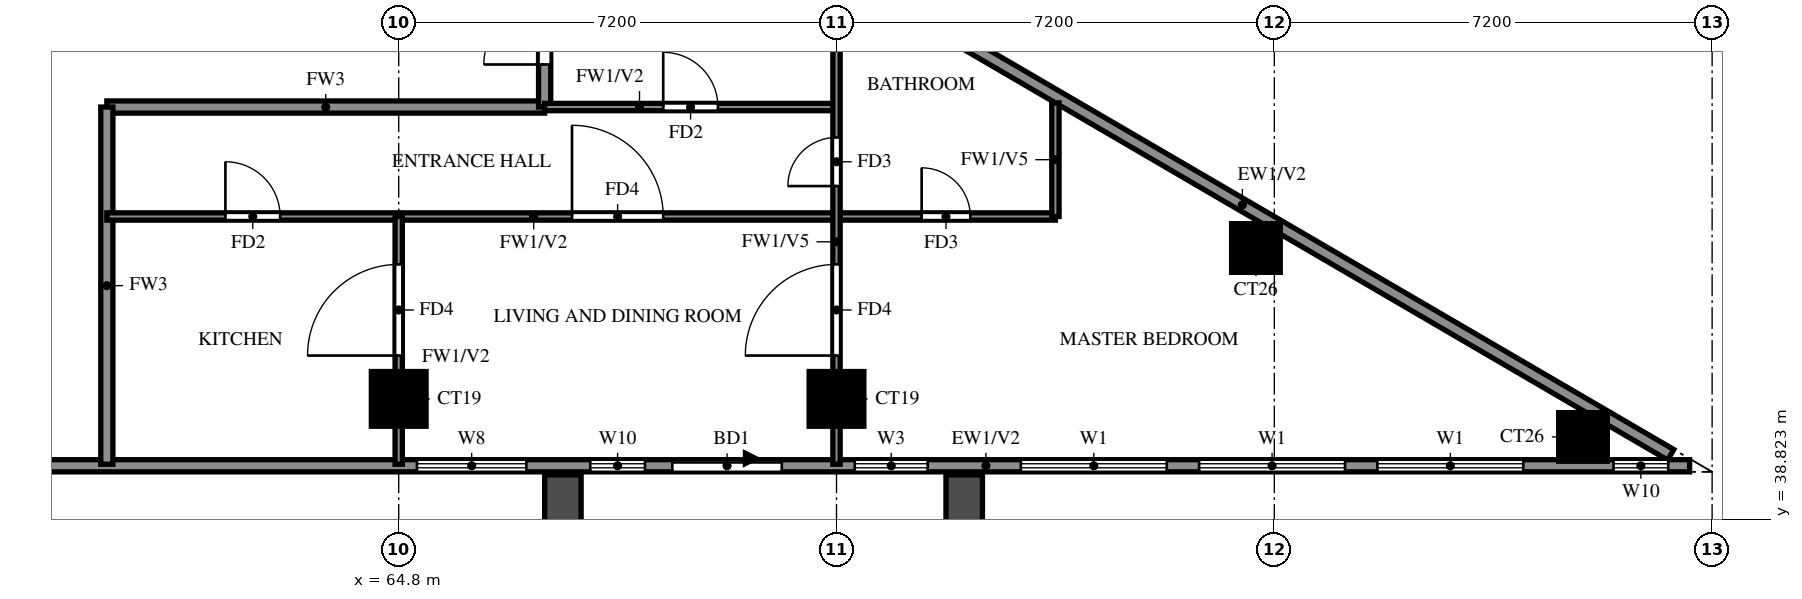
"""IFC4 building model, lengths in metres.
Left out: names, types, materials, properties, quantities, classifications, styles, units other than length and angle.
Written with IfcOpenShell. Run it as: python <this file> out.ifc"""

import sys

from ifc_helpers import new_model, si_unit, direction, frame, frame_2d, origin, origin_2d, place, context, subcontext, project, spatial, rectangle, extrude, source, transform, mapped, element, fill, save


model = new_model("IFC4")
c1 = context("Model", 3, precision=1e-05, world=origin(), true_north=direction((0.0, 1.0)))
c2 = subcontext(c1, "Body", "Model", "MODEL_VIEW")
j1 = project(units=[si_unit("LENGTHUNIT", "METRE"), si_unit("PLANEANGLEUNIT", "RADIAN")], contexts=[c1])
p1 = place(None, origin())
s1 = spatial("IfcSite", under=j1, at=p1, CompositionType="ELEMENT")
p2 = place(p1, origin())
s2 = spatial("IfcBuilding", under=s1, at=p2, CompositionType="ELEMENT")
p3 = place(p2, frame((0.0, 0.0, 185.0)))
s3 = spatial("IfcBuildingStorey", under=s2, at=p3, CompositionType="ELEMENT", Elevation=185.0)
m1 = source(origin(), c2, "Body", "SweptSolid", [
    extrude(rectangle(XDim=0.8, YDim=0.8, at=origin_2d()), origin(), (0.0, 0.0, 1.0), 3.2),
])
p4 = place(p3, frame((84.276, 40.174, 0.0), z_axis=(0.0, 0.0, 1.0), x_axis=(1.0, 0.0, 0.0)))
e1 = element("IfcColumn", 1, at=p4, inside=s3, PredefinedType="COLUMN", context=c2, shape_type="MappedRepresentation", body=[
    mapped(m1, transform((0.0, 0.0, 0.0))),
])
m2 = source(origin(), c2, "Body", "SweptSolid", [
    extrude(rectangle(XDim=0.9, YDim=0.9, at=origin_2d()), origin(), (0.0, 0.0, 1.0), 3.2),
])
for number, where, z_axis, x_axis in (
    (2, (64.8, 40.8, 0.0), (0.0, 0.0, 1.0), (1.0, 0.0, 0.0)),
    (3, (72.0, 40.8, 0.0), (0.0, 0.0, 1.0), (1.0, 0.0, 0.0)),
):
    element("IfcColumn", number, at=place(p3, frame(where, z_axis=z_axis, x_axis=x_axis)), inside=s3, PredefinedType="COLUMN", context=c2, shape_type="MappedRepresentation", body=[
        mapped(m2, transform((0.0, 0.0, 0.0))),
    ])
p5 = place(p3, frame((78.898, 43.282, 0.0), z_axis=(0.0, 0.0, 1.0), x_axis=(1.0, 0.0, 0.0)))
e4 = element("IfcColumn", 4, at=p5, inside=s3, PredefinedType="COLUMN", context=c2, shape_type="MappedRepresentation", body=[
    mapped(m1, transform((0.0, 0.0, 0.0))),
])
p6 = place(p3, frame((85.719, 39.881, 0.0), z_axis=(0.0, 0.0, 1.0), x_axis=(-0.86377618652, 0.503875678716, 0.0)))
e5 = element("IfcWall", 5, at=p6, inside=s3, PredefinedType="SOLIDWALL", context=c2, shape_type="SweptSolid", body=[
    extrude(rectangle(XDim=16.311, YDim=0.2, at=frame_2d((8.156, 0.0))), origin(), (0.0, 0.0, 1.0), 3.2),
])
p7 = place(p6, frame((13.326, 0.0, 1.5)))
e6 = element("IfcOpeningElement", 6, at=p7, cuts=e5, PredefinedType="OPENING", context=c2, shape_type="SweptSolid", body=[
    extrude(rectangle(XDim=0.9, YDim=0.9, at=frame_2d((0.45, 0.45))), frame((0.0, 0.11, 0.0), z_axis=(0.0, -1.0, 0.0), x_axis=(1.0, 0.0, 0.0)), (0.0, 0.0, 1.0), 0.22),
])
p8 = place(p3, frame((58.8, 39.7, 0.0), z_axis=(0.0, 0.0, 1.0), x_axis=(1.0, 0.0, 0.0)))
e7 = element("IfcWall", 7, at=p8, inside=s3, PredefinedType="SOLIDWALL", context=c2, shape_type="SweptSolid", body=[
    extrude(rectangle(XDim=27.23, YDim=0.2, at=frame_2d((13.615, 0.0))), origin(), (0.0, 0.0, 1.0), 3.2),
])
p9 = place(p8, frame((10.5, 0.0, 0.0)))
e8 = element("IfcOpeningElement", 8, at=p9, cuts=e7, PredefinedType="OPENING", context=c2, shape_type="SweptSolid", body=[
    extrude(rectangle(XDim=1.8, YDim=2.4, at=frame_2d((0.9, 1.2))), frame((0.0, 0.11, 0.0), z_axis=(0.0, -1.0, 0.0), x_axis=(1.0, 0.0, 0.0)), (0.0, 0.0, 1.0), 0.22),
])
p10 = place(p8, frame((6.3, 0.0, 0.6)))
e9 = element("IfcOpeningElement", 9, at=p10, cuts=e7, PredefinedType="OPENING", context=c2, shape_type="SweptSolid", body=[
    extrude(rectangle(XDim=1.8, YDim=2.4, at=frame_2d((0.9, 1.2))), frame((0.0, 0.11, 0.0), z_axis=(0.0, -1.0, 0.0), x_axis=(1.0, 0.0, 0.0)), (0.0, 0.0, 1.0), 0.22),
])
p11 = place(p8, frame((9.15, 0.0, 0.6)))
e10 = element("IfcOpeningElement", 10, at=p11, cuts=e7, PredefinedType="OPENING", context=c2, shape_type="SweptSolid", body=[
    extrude(rectangle(XDim=0.9, YDim=2.4, at=frame_2d((0.45, 1.2))), frame((0.0, 0.11, 0.0), z_axis=(0.0, -1.0, 0.0), x_axis=(1.0, 0.0, 0.0)), (0.0, 0.0, 1.0), 0.22),
])
p12 = place(p8, frame((13.5, 0.0, 0.6)))
e11 = element("IfcOpeningElement", 11, at=p12, cuts=e7, PredefinedType="OPENING", context=c2, shape_type="SweptSolid", body=[
    extrude(rectangle(XDim=1.2, YDim=2.4, at=frame_2d((0.6, 1.2))), frame((0.0, 0.11, 0.0), z_axis=(0.0, -1.0, 0.0), x_axis=(1.0, 0.0, 0.0)), (0.0, 0.0, 1.0), 0.22),
])
p13 = place(p8, frame((16.231, 0.0, 0.6)))
e12 = element("IfcOpeningElement", 12, at=p13, cuts=e7, PredefinedType="OPENING", context=c2, shape_type="SweptSolid", body=[
    extrude(rectangle(XDim=2.4, YDim=2.4, at=frame_2d((1.2, 1.2))), frame((0.0, 0.11, 0.0), z_axis=(0.0, -1.0, 0.0), x_axis=(1.0, 0.0, 0.0)), (0.0, 0.0, 1.0), 0.22),
])
p14 = place(p8, frame((19.163, 0.0, 0.6)))
e13 = element("IfcOpeningElement", 13, at=p14, cuts=e7, PredefinedType="OPENING", context=c2, shape_type="SweptSolid", body=[
    extrude(rectangle(XDim=2.4, YDim=2.4, at=frame_2d((1.2, 1.2))), frame((0.0, 0.11, 0.0), z_axis=(0.0, -1.0, 0.0), x_axis=(1.0, 0.0, 0.0)), (0.0, 0.0, 1.0), 0.22),
])
p15 = place(p8, frame((22.094, 0.0, 0.6)))
e14 = element("IfcOpeningElement", 14, at=p15, cuts=e7, PredefinedType="OPENING", context=c2, shape_type="SweptSolid", body=[
    extrude(rectangle(XDim=2.4, YDim=2.4, at=frame_2d((1.2, 1.2))), frame((0.0, 0.11, 0.0), z_axis=(0.0, -1.0, 0.0), x_axis=(1.0, 0.0, 0.0)), (0.0, 0.0, 1.0), 0.22),
])
p16 = place(p8, frame((25.978, 0.0, 0.6)))
e15 = element("IfcOpeningElement", 15, at=p16, cuts=e7, PredefinedType="OPENING", context=c2, shape_type="SweptSolid", body=[
    extrude(rectangle(XDim=0.9, YDim=2.4, at=frame_2d((0.45, 1.2))), frame((0.0, 0.11, 0.0), z_axis=(0.0, -1.0, 0.0), x_axis=(1.0, 0.0, 0.0)), (0.0, 0.0, 1.0), 0.22),
])
for number, where, z_axis, x_axis in (
    (16, (67.5, 39.55, 0.0), (0.0, 0.0, 1.0), (0.0, -1.0, 0.0)),
    (17, (74.1, 39.55, 0.0), (0.0, 0.0, 1.0), (0.0, -1.0, 0.0)),
):
    element("IfcWall", number, at=place(p3, frame(where, z_axis=z_axis, x_axis=x_axis)), inside=s3, PredefinedType="SOLIDWALL", context=c2, shape_type="SweptSolid", body=[
        extrude(rectangle(XDim=2.65, YDim=0.6, at=frame_2d((1.325, 0.0))), origin(), (0.0, 0.0, 1.0), 2.85),
    ])
p17 = place(p3, frame((60.0, 45.6, 0.0), z_axis=(0.0, 0.0, 1.0), x_axis=(1.0, 0.0, 0.0)))
e18 = element("IfcWall", 18, at=p17, inside=s3, PredefinedType="SOLIDWALL", context=c2, shape_type="SweptSolid", body=[
    extrude(rectangle(XDim=7.2, YDim=0.2, at=frame_2d((3.6, 0.0))), origin(), (0.0, 0.0, 1.0), 3.2),
])
p18 = place(p3, frame((60.0, 39.725, 0.0), z_axis=(0.0, 0.0, 1.0), x_axis=(0.0, 1.0, 0.0)))
e19 = element("IfcWall", 19, at=p18, inside=s3, PredefinedType="SOLIDWALL", context=c2, shape_type="SweptSolid", body=[
    extrude(rectangle(XDim=5.875, YDim=0.2, at=frame_2d((2.938, 0.0))), origin(), (0.0, 0.0, 1.0), 3.2),
])
p19 = place(p3, frame((67.2, 45.6, 0.0), z_axis=(0.0, 0.0, 1.0), x_axis=(0.0, 1.0, 0.0)))
e20 = element("IfcWall", 20, at=p19, inside=s3, PredefinedType="SOLIDWALL", context=c2, shape_type="SweptSolid", body=[
    extrude(rectangle(XDim=16.8, YDim=0.2, at=frame_2d((8.4, 0.0))), origin(), (0.0, 0.0, 1.0), 3.2),
])
p20 = place(p19, frame((8.3, 0.0, 0.0)))
e21 = element("IfcOpeningElement", 21, at=p20, cuts=e20, PredefinedType="OPENING", context=c2, shape_type="SweptSolid", body=[
    extrude(rectangle(XDim=1.0, YDim=2.1, at=frame_2d((0.5, 1.05))), frame((0.0, 0.11, 0.0), z_axis=(0.0, -1.0, 0.0), x_axis=(1.0, 0.0, 0.0)), (0.0, 0.0, 1.0), 0.22),
])
p21 = place(p19, frame((15.1, 0.0, 0.0)))
e22 = element("IfcOpeningElement", 22, at=p21, cuts=e20, PredefinedType="OPENING", context=c2, shape_type="SweptSolid", body=[
    extrude(rectangle(XDim=1.0, YDim=2.1, at=frame_2d((0.5, 1.05))), frame((0.0, 0.11, 0.0), z_axis=(0.0, -1.0, 0.0), x_axis=(1.0, 0.0, 0.0)), (0.0, 0.0, 1.0), 0.22),
])
p22 = place(p19, frame((0.7, 0.0, 0.0)))
e23 = element("IfcOpeningElement", 23, at=p22, cuts=e20, PredefinedType="OPENING", context=c2, shape_type="SweptSolid", body=[
    extrude(rectangle(XDim=1.0, YDim=2.1, at=frame_2d((0.5, 1.05))), frame((0.0, 0.11, 0.0), z_axis=(0.0, -1.0, 0.0), x_axis=(1.0, 0.0, 0.0)), (0.0, 0.0, 1.0), 0.22),
])
p23 = place(p3, frame((60.0, 43.8, 0.0), z_axis=(0.0, 0.0, 1.0), x_axis=(1.0, 0.0, 0.0)))
e24 = element("IfcWall", 24, at=p23, inside=s3, PredefinedType="PARTITIONING", context=c2, shape_type="SweptSolid", body=[
    extrude(rectangle(XDim=15.6, YDim=0.12, at=frame_2d((7.8, 0.0))), origin(), (0.0, 0.0, 1.0), 3.2),
])
p24 = place(p23, frame((7.65, 0.0, 0.0)))
e25 = element("IfcOpeningElement", 25, at=p24, cuts=e24, PredefinedType="OPENING", context=c2, shape_type="SweptSolid", body=[
    extrude(rectangle(XDim=1.5, YDim=2.1, at=frame_2d((0.75, 1.05))), frame((0.0, 0.07, 0.0), z_axis=(0.0, -1.0, 0.0), x_axis=(1.0, 0.0, 0.0)), (0.0, 0.0, 1.0), 0.14),
])
p25 = place(p23, frame((1.95, 0.0, 0.0)))
e26 = element("IfcOpeningElement", 26, at=p25, cuts=e24, PredefinedType="OPENING", context=c2, shape_type="SweptSolid", body=[
    extrude(rectangle(XDim=0.9, YDim=2.1, at=frame_2d((0.45, 1.05))), frame((0.0, 0.07, 0.0), z_axis=(0.0, -1.0, 0.0), x_axis=(1.0, 0.0, 0.0)), (0.0, 0.0, 1.0), 0.14),
])
p26 = place(p23, frame((13.4, 0.0, 0.0)))
e27 = element("IfcOpeningElement", 27, at=p26, cuts=e24, PredefinedType="OPENING", context=c2, shape_type="SweptSolid", body=[
    extrude(rectangle(XDim=0.8, YDim=2.1, at=frame_2d((0.4, 1.05))), frame((0.0, 0.07, 0.0), z_axis=(0.0, -1.0, 0.0), x_axis=(1.0, 0.0, 0.0)), (0.0, 0.0, 1.0), 0.14),
])
p27 = place(p3, frame((67.2, 45.6, 0.0), z_axis=(0.0, 0.0, 1.0), x_axis=(1.0, 0.0, 0.0)))
e28 = element("IfcWall", 28, at=p27, inside=s3, PredefinedType="PARTITIONING", context=c2, shape_type="SweptSolid", body=[
    extrude(rectangle(XDim=4.8, YDim=0.12, at=frame_2d((2.4, 0.0))), origin(), (0.0, 0.0, 1.0), 3.2),
])
p28 = place(p27, frame((1.95, 0.0, 0.0)))
e29 = element("IfcOpeningElement", 29, at=p28, cuts=e28, PredefinedType="OPENING", context=c2, shape_type="SweptSolid", body=[
    extrude(rectangle(XDim=0.9, YDim=2.1, at=frame_2d((0.45, 1.05))), frame((0.0, 0.07, 0.0), z_axis=(0.0, -1.0, 0.0), x_axis=(1.0, 0.0, 0.0)), (0.0, 0.0, 1.0), 0.14),
])
p29 = place(p3, frame((64.8, 39.725, 0.0), z_axis=(0.0, 0.0, 1.0), x_axis=(0.0, 1.0, 0.0)))
e30 = element("IfcWall", 30, at=p29, inside=s3, PredefinedType="PARTITIONING", context=c2, shape_type="SweptSolid", body=[
    extrude(rectangle(XDim=4.075, YDim=0.12, at=frame_2d((2.038, 0.0))), origin(), (0.0, 0.0, 1.0), 3.2),
])
p30 = place(p29, frame((1.788, 0.0, 0.0)))
e31 = element("IfcOpeningElement", 31, at=p30, cuts=e30, PredefinedType="OPENING", context=c2, shape_type="SweptSolid", body=[
    extrude(rectangle(XDim=1.5, YDim=2.1, at=frame_2d((0.75, 1.05))), frame((0.0, 0.07, 0.0), z_axis=(0.0, -1.0, 0.0), x_axis=(1.0, 0.0, 0.0)), (0.0, 0.0, 1.0), 0.14),
])
p31 = place(p3, frame((72.0, 39.725, 0.0), z_axis=(0.0, 0.0, 1.0), x_axis=(0.0, 1.0, 0.0)))
e32 = element("IfcWall", 32, at=p31, inside=s3, PredefinedType="PARTITIONING", context=c2, shape_type="SweptSolid", body=[
    extrude(rectangle(XDim=8.13, YDim=0.12, at=frame_2d((4.065, 0.0))), origin(), (0.0, 0.0, 1.0), 2.3),
])
p32 = place(p31, frame((1.788, 0.0, 0.0)))
e33 = element("IfcOpeningElement", 33, at=p32, cuts=e32, PredefinedType="OPENING", context=c2, shape_type="SweptSolid", body=[
    extrude(rectangle(XDim=1.5, YDim=2.1, at=frame_2d((0.75, 1.05))), frame((0.0, 0.07, 0.0), z_axis=(0.0, -1.0, 0.0), x_axis=(1.0, 0.0, 0.0)), (0.0, 0.0, 1.0), 0.14),
])
p33 = place(p31, frame((4.575, 0.0, 0.0)))
e34 = element("IfcOpeningElement", 34, at=p33, cuts=e32, PredefinedType="OPENING", context=c2, shape_type="SweptSolid", body=[
    extrude(rectangle(XDim=0.8, YDim=2.1, at=frame_2d((0.4, 1.05))), frame((0.0, 0.07, 0.0), z_axis=(0.0, -1.0, 0.0), x_axis=(1.0, 0.0, 0.0)), (0.0, 0.0, 1.0), 0.14),
])
p34 = place(p3, frame((75.6, 43.8, 0.0), z_axis=(0.0, 0.0, 1.0), x_axis=(0.0, 1.0, 0.0)))
e35 = element("IfcWall", 35, at=p34, inside=s3, PredefinedType="PARTITIONING", context=c2, shape_type="SweptSolid", body=[
    extrude(rectangle(XDim=1.868, YDim=0.12, at=frame_2d((0.934, 0.0))), origin(), (0.0, 0.0, 1.0), 2.3),
])
p35 = place(p9, origin())
e36 = element("IfcDoor", 36, at=p35, inside=s3, OperationType="DOUBLE_DOOR_SLIDING", PredefinedType="DOOR", context=c2, shape_type="SweptSolid", body=[
    extrude(rectangle(XDim=1.8, YDim=2.4, at=frame_2d((0.9, 1.2))), frame((0.0, 0.025, 0.0), z_axis=(0.0, -1.0, 0.0), x_axis=(1.0, 0.0, 0.0)), (0.0, 0.0, 1.0), 0.05),
])
fill(e8, e36)
p36 = place(p10, origin())
e37 = element("IfcWindow", 37, at=p36, inside=s3, PartitioningType="DOUBLE_PANEL_VERTICAL", PredefinedType="WINDOW", context=c2, shape_type="SweptSolid", body=[
    extrude(rectangle(XDim=1.8, YDim=2.4, at=frame_2d((0.9, 1.2))), frame((0.0, 0.03, 0.0), z_axis=(0.0, -1.0, 0.0), x_axis=(1.0, 0.0, 0.0)), (0.0, 0.0, 1.0), 0.06),
])
fill(e9, e37)
p37 = place(p11, origin())
e38 = element("IfcWindow", 38, at=p37, inside=s3, PartitioningType="SINGLE_PANEL", PredefinedType="WINDOW", context=c2, shape_type="SweptSolid", body=[
    extrude(rectangle(XDim=0.9, YDim=2.4, at=frame_2d((0.45, 1.2))), frame((0.0, 0.03, 0.0), z_axis=(0.0, -1.0, 0.0), x_axis=(1.0, 0.0, 0.0)), (0.0, 0.0, 1.0), 0.06),
])
fill(e10, e38)
p38 = place(p12, origin())
e39 = element("IfcWindow", 39, at=p38, inside=s3, PartitioningType="SINGLE_PANEL", PredefinedType="WINDOW", context=c2, shape_type="SweptSolid", body=[
    extrude(rectangle(XDim=1.2, YDim=2.4, at=frame_2d((0.6, 1.2))), frame((0.0, 0.03, 0.0), z_axis=(0.0, -1.0, 0.0), x_axis=(1.0, 0.0, 0.0)), (0.0, 0.0, 1.0), 0.06),
])
fill(e11, e39)
p39 = place(p13, origin())
e40 = element("IfcWindow", 40, at=p39, inside=s3, PartitioningType="DOUBLE_PANEL_VERTICAL", PredefinedType="WINDOW", context=c2, shape_type="SweptSolid", body=[
    extrude(rectangle(XDim=2.4, YDim=2.4, at=frame_2d((1.2, 1.2))), frame((0.0, 0.03, 0.0), z_axis=(0.0, -1.0, 0.0), x_axis=(1.0, 0.0, 0.0)), (0.0, 0.0, 1.0), 0.06),
])
fill(e12, e40)
p40 = place(p14, origin())
e41 = element("IfcWindow", 41, at=p40, inside=s3, PartitioningType="DOUBLE_PANEL_VERTICAL", PredefinedType="WINDOW", context=c2, shape_type="SweptSolid", body=[
    extrude(rectangle(XDim=2.4, YDim=2.4, at=frame_2d((1.2, 1.2))), frame((0.0, 0.03, 0.0), z_axis=(0.0, -1.0, 0.0), x_axis=(1.0, 0.0, 0.0)), (0.0, 0.0, 1.0), 0.06),
])
fill(e13, e41)
p41 = place(p15, origin())
e42 = element("IfcWindow", 42, at=p41, inside=s3, PartitioningType="DOUBLE_PANEL_VERTICAL", PredefinedType="WINDOW", context=c2, shape_type="SweptSolid", body=[
    extrude(rectangle(XDim=2.4, YDim=2.4, at=frame_2d((1.2, 1.2))), frame((0.0, 0.03, 0.0), z_axis=(0.0, -1.0, 0.0), x_axis=(1.0, 0.0, 0.0)), (0.0, 0.0, 1.0), 0.06),
])
fill(e14, e42)
p42 = place(p16, origin())
e43 = element("IfcWindow", 43, at=p42, inside=s3, PartitioningType="SINGLE_PANEL", PredefinedType="WINDOW", context=c2, shape_type="SweptSolid", body=[
    extrude(rectangle(XDim=0.9, YDim=2.4, at=frame_2d((0.45, 1.2))), frame((0.0, 0.03, 0.0), z_axis=(0.0, -1.0, 0.0), x_axis=(1.0, 0.0, 0.0)), (0.0, 0.0, 1.0), 0.06),
])
fill(e15, e43)
p43 = place(p30, origin())
e44 = element("IfcDoor", 44, at=p43, inside=s3, OperationType="SINGLE_SWING_LEFT", PredefinedType="DOOR", context=c2, shape_type="SweptSolid", body=[
    extrude(rectangle(XDim=1.5, YDim=2.1, at=frame_2d((0.75, 1.05))), frame((0.0, 0.025, 0.0), z_axis=(0.0, -1.0, 0.0), x_axis=(1.0, 0.0, 0.0)), (0.0, 0.0, 1.0), 0.05),
])
fill(e31, e44)
p44 = place(p28, origin())
e45 = element("IfcDoor", 45, at=p44, inside=s3, OperationType="SINGLE_SWING_LEFT", PredefinedType="DOOR", context=c2, shape_type="SweptSolid", body=[
    extrude(rectangle(XDim=0.9, YDim=2.1, at=frame_2d((0.45, 1.05))), frame((0.0, 0.025, 0.0), z_axis=(0.0, -1.0, 0.0), x_axis=(1.0, 0.0, 0.0)), (0.0, 0.0, 1.0), 0.05),
])
fill(e29, e45)
p45 = place(p22, origin())
e46 = element("IfcDoor", 46, at=p45, inside=s3, OperationType="SINGLE_SWING_LEFT", PredefinedType="DOOR", context=c2, shape_type="SweptSolid", body=[
    extrude(rectangle(XDim=1.0, YDim=2.1, at=frame_2d((0.5, 1.05))), frame((0.0, 0.025, 0.0), z_axis=(0.0, -1.0, 0.0), x_axis=(1.0, 0.0, 0.0)), (0.0, 0.0, 1.0), 0.05),
])
fill(e23, e46)
p46 = place(p24, origin())
e47 = element("IfcDoor", 47, at=p46, inside=s3, OperationType="SINGLE_SWING_RIGHT", PredefinedType="DOOR", context=c2, shape_type="SweptSolid", body=[
    extrude(rectangle(XDim=1.5, YDim=2.1, at=frame_2d((0.75, 1.05))), frame((0.0, 0.025, 0.0), z_axis=(0.0, -1.0, 0.0), x_axis=(1.0, 0.0, 0.0)), (0.0, 0.0, 1.0), 0.05),
])
fill(e25, e47)
p47 = place(p25, origin())
e48 = element("IfcDoor", 48, at=p47, inside=s3, OperationType="SINGLE_SWING_LEFT", PredefinedType="DOOR", context=c2, shape_type="SweptSolid", body=[
    extrude(rectangle(XDim=0.9, YDim=2.1, at=frame_2d((0.45, 1.05))), frame((0.0, 0.025, 0.0), z_axis=(0.0, -1.0, 0.0), x_axis=(1.0, 0.0, 0.0)), (0.0, 0.0, 1.0), 0.05),
])
fill(e26, e48)
p48 = place(p32, origin())
e49 = element("IfcDoor", 49, at=p48, inside=s3, OperationType="SINGLE_SWING_RIGHT", PredefinedType="DOOR", context=c2, shape_type="SweptSolid", body=[
    extrude(rectangle(XDim=1.5, YDim=2.1, at=frame_2d((0.75, 1.05))), frame((0.0, 0.025, 0.0), z_axis=(0.0, -1.0, 0.0), x_axis=(1.0, 0.0, 0.0)), (0.0, 0.0, 1.0), 0.05),
])
fill(e33, e49)
p49 = place(p33, origin())
e50 = element("IfcDoor", 50, at=p49, inside=s3, OperationType="SINGLE_SWING_RIGHT", PredefinedType="DOOR", context=c2, shape_type="SweptSolid", body=[
    extrude(rectangle(XDim=0.8, YDim=2.1, at=frame_2d((0.4, 1.05))), frame((0.0, 0.025, 0.0), z_axis=(0.0, -1.0, 0.0), x_axis=(1.0, 0.0, 0.0)), (0.0, 0.0, 1.0), 0.05),
])
fill(e34, e50)
p50 = place(p26, origin())
e51 = element("IfcDoor", 51, at=p50, inside=s3, OperationType="SINGLE_SWING_LEFT", PredefinedType="DOOR", context=c2, shape_type="SweptSolid", body=[
    extrude(rectangle(XDim=0.8, YDim=2.1, at=frame_2d((0.4, 1.05))), frame((0.0, 0.025, 0.0), z_axis=(0.0, -1.0, 0.0), x_axis=(1.0, 0.0, 0.0)), (0.0, 0.0, 1.0), 0.05),
])
fill(e27, e51)
save(model, sys.argv[1])
